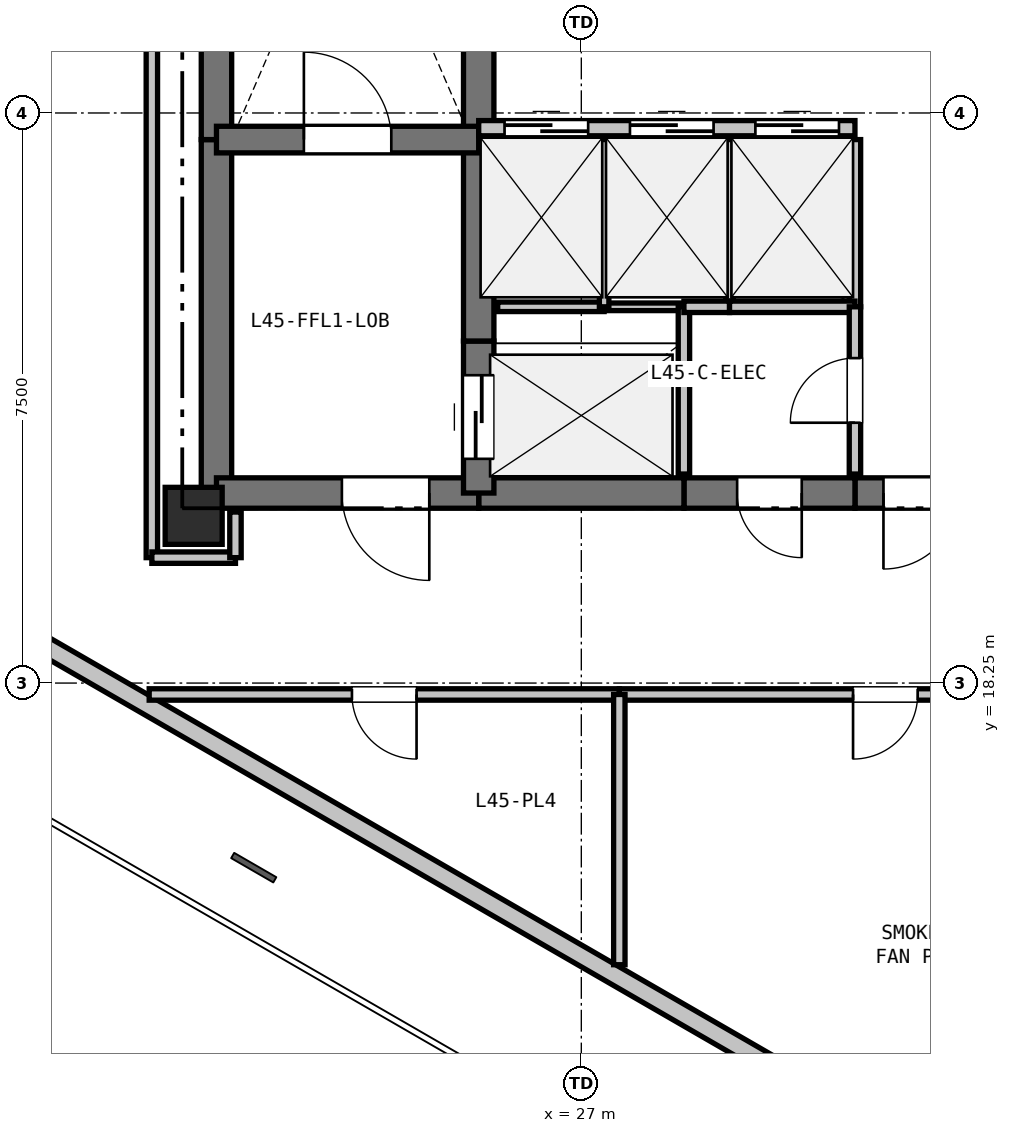
"""IFC4 building model, lengths in metres.
Left out: names, types, materials, properties, quantities, classifications, styles, units other than length and angle.
Written with IfcOpenShell. Run it as: python <this file> out.ifc"""

import sys

from ifc_helpers import new_model, si_unit, direction, frame, frame_2d, origin, origin_2d, place, context, subcontext, project, spatial, rectangle, extrude, element, fill, save


model = new_model("IFC4")
c1 = context("Model", 3, precision=1e-05, world=origin(), true_north=direction((0.0, 1.0)))
c2 = subcontext(c1, "Body", "Model", "MODEL_VIEW")
j1 = project(units=[si_unit("LENGTHUNIT", "METRE"), si_unit("PLANEANGLEUNIT", "RADIAN")], contexts=[c1])
p1 = place(None, origin())
s1 = spatial("IfcSite", under=j1, at=p1, CompositionType="ELEMENT")
p2 = place(p1, origin())
s2 = spatial("IfcBuilding", under=s1, at=p2, CompositionType="ELEMENT")
p3 = place(p2, frame((0.0, 0.0, 160.8)))
s3 = spatial("IfcBuildingStorey", under=s2, at=p3, CompositionType="ELEMENT", Elevation=160.8)
p4 = place(p3, frame((21.9, 20.45, 0.0), z_axis=(0.0, 0.0, 1.0), x_axis=(1.0, 0.0, 0.0)))
e1 = element("IfcColumn", 1, at=p4, inside=s3, PredefinedType="COLUMN", context=c2, shape_type="SweptSolid", body=[
    extrude(rectangle(XDim=0.75, YDim=0.75, at=origin_2d()), origin(), (0.0, 0.0, 1.0), 6.6),
])
p5 = place(p3, frame((38.22, 8.183, 0.0), z_axis=(0.0, 0.0, 1.0), x_axis=(-0.866026432802, 0.499998217685, 0.0)))
e2 = element("IfcWall", 2, at=p5, inside=s3, PredefinedType="SOLIDWALL", context=c2, shape_type="SweptSolid", body=[
    extrude(rectangle(XDim=34.537, YDim=0.25, at=frame_2d((17.269, 0.0))), origin(), (0.0, 0.0, 1.0), 5.005),
])
p6 = place(p3, frame((22.2, 20.75, 0.0), z_axis=(0.0, 0.0, 1.0), x_axis=(0.0, 1.0, 0.0)))
e3 = element("IfcWall", 3, at=p6, inside=s3, PredefinedType="SHEAR", context=c2, shape_type="SweptSolid", body=[
    extrude(rectangle(XDim=4.65, YDim=0.4, at=frame_2d((2.325, 0.0))), origin(), (0.0, 0.0, 1.0), 6.37),
])
p7 = place(p3, frame((22.2, 25.4, 0.0), z_axis=(0.0, 0.0, 1.0), x_axis=(0.0, 1.0, 0.0)))
e4 = element("IfcWall", 4, at=p7, inside=s3, PredefinedType="SHEAR", context=c2, shape_type="SweptSolid", body=[
    extrude(rectangle(XDim=7.35, YDim=0.4, at=frame_2d((3.675, 0.0))), origin(), (0.0, 0.0, 1.0), 6.37),
])
p8 = place(p3, frame((32.35, 20.75, 0.0), z_axis=(0.0, 0.0, 1.0), x_axis=(-1.0, 0.0, 0.0)))
e5 = element("IfcWall", 5, at=p8, inside=s3, PredefinedType="SHEAR", context=c2, shape_type="SweptSolid", body=[
    extrude(rectangle(XDim=1.75, YDim=0.4, at=frame_2d((0.875, 0.0))), origin(), (0.0, 0.0, 1.0), 6.37),
])
p9 = place(p8, frame((0.375, 0.0, 0.0)))
e6 = element("IfcOpeningElement", 6, at=p9, cuts=e5, PredefinedType="OPENING", context=c2, shape_type="SweptSolid", body=[
    extrude(rectangle(XDim=1.0, YDim=2.15, at=frame_2d((0.5, 1.075))), frame((0.0, 0.21, 0.0), z_axis=(0.0, -1.0, 0.0), x_axis=(1.0, 0.0, 0.0)), (0.0, 0.0, 1.0), 0.42),
])
p10 = place(p3, frame((30.6, 20.75, 0.0), z_axis=(0.0, 0.0, 1.0), x_axis=(-1.0, 0.0, 0.0)))
e7 = element("IfcWall", 7, at=p10, inside=s3, PredefinedType="SHEAR", context=c2, shape_type="SweptSolid", body=[
    extrude(rectangle(XDim=2.25, YDim=0.4, at=frame_2d((1.125, 0.0))), origin(), (0.0, 0.0, 1.0), 6.37),
])
p11 = place(p10, frame((0.7, 0.0, 0.0)))
e8 = element("IfcOpeningElement", 8, at=p11, cuts=e7, PredefinedType="OPENING", context=c2, shape_type="SweptSolid", body=[
    extrude(rectangle(XDim=0.85, YDim=2.1, at=frame_2d((0.425, 1.05))), frame((0.0, 0.21, 0.0), z_axis=(0.0, -1.0, 0.0), x_axis=(1.0, 0.0, 0.0)), (0.0, 0.0, 1.0), 0.42),
])
p12 = place(p3, frame((28.35, 20.75, 0.0), z_axis=(0.0, 0.0, 1.0), x_axis=(-1.0, 0.0, 0.0)))
e9 = element("IfcWall", 9, at=p12, inside=s3, PredefinedType="SHEAR", context=c2, shape_type="SweptSolid", body=[
    extrude(rectangle(XDim=2.7, YDim=0.4, at=frame_2d((1.35, 0.0))), origin(), (0.0, 0.0, 1.0), 6.37),
])
p13 = place(p3, frame((25.65, 20.75, 0.0), z_axis=(0.0, 0.0, 1.0), x_axis=(-1.0, 0.0, 0.0)))
e10 = element("IfcWall", 10, at=p13, inside=s3, PredefinedType="SHEAR", context=c2, shape_type="SweptSolid", body=[
    extrude(rectangle(XDim=3.45, YDim=0.4, at=frame_2d((1.725, 0.0))), origin(), (0.0, 0.0, 1.0), 6.37),
])
p14 = place(p13, frame((0.65, 0.0, 0.0)))
e11 = element("IfcOpeningElement", 11, at=p14, cuts=e10, PredefinedType="OPENING", context=c2, shape_type="SweptSolid", body=[
    extrude(rectangle(XDim=1.15, YDim=2.15, at=frame_2d((0.575, 1.075))), frame((0.0, 0.21, 0.0), z_axis=(0.0, -1.0, 0.0), x_axis=(1.0, 0.0, 0.0)), (0.0, 0.0, 1.0), 0.42),
])
p15 = place(p3, frame((25.65, 20.75, 0.0), z_axis=(0.0, 0.0, 1.0), x_axis=(0.0, 1.0, 0.0)))
e12 = element("IfcWall", 12, at=p15, inside=s3, PredefinedType="SHEAR", context=c2, shape_type="SweptSolid", body=[
    extrude(rectangle(XDim=2.0, YDim=0.4, at=frame_2d((1.0, 0.0))), origin(), (0.0, 0.0, 1.0), 6.37),
])
p16 = place(p15, frame((0.45, 0.0, 0.0)))
e13 = element("IfcOpeningElement", 13, at=p16, cuts=e12, PredefinedType="OPENING", context=c2, shape_type="SweptSolid", body=[
    extrude(rectangle(XDim=1.1, YDim=2.15, at=frame_2d((0.55, 1.075))), frame((0.0, 0.21, 0.0), z_axis=(0.0, -1.0, 0.0), x_axis=(1.0, 0.0, 0.0)), (0.0, 0.0, 1.0), 0.42),
])
p17 = place(p3, frame((25.65, 22.75, 0.0), z_axis=(0.0, 0.0, 1.0), x_axis=(0.0, 1.0, 0.0)))
e14 = element("IfcWall", 14, at=p17, inside=s3, PredefinedType="SHEAR", context=c2, shape_type="SweptSolid", body=[
    extrude(rectangle(XDim=2.8, YDim=0.4, at=frame_2d((1.4, 0.0))), origin(), (0.0, 0.0, 1.0), 6.37),
])
p18 = place(p3, frame((25.65, 25.55, 0.0), z_axis=(0.0, 0.0, 1.0), x_axis=(0.0, 1.0, 0.0)))
e15 = element("IfcWall", 15, at=p18, inside=s3, PredefinedType="SHEAR", context=c2, shape_type="SweptSolid", body=[
    extrude(rectangle(XDim=2.4, YDim=0.4, at=frame_2d((1.2, 0.0))), origin(), (0.0, 0.0, 1.0), 6.37),
])
p19 = place(p3, frame((22.2, 25.4, 0.0), z_axis=(0.0, 0.0, 1.0), x_axis=(1.0, 0.0, 0.0)))
e16 = element("IfcWall", 16, at=p19, inside=s3, PredefinedType="SHEAR", context=c2, shape_type="SweptSolid", body=[
    extrude(rectangle(XDim=3.45, YDim=0.35, at=frame_2d((1.725, 0.0))), origin(), (0.0, 0.0, 1.0), 6.37),
])
p20 = place(p19, frame((1.15, 0.0, 0.0)))
e17 = element("IfcOpeningElement", 17, at=p20, cuts=e16, PredefinedType="OPENING", context=c2, shape_type="SweptSolid", body=[
    extrude(rectangle(XDim=1.15, YDim=2.15, at=frame_2d((0.575, 1.075))), frame((0.0, 0.185, 0.0), z_axis=(0.0, -1.0, 0.0), x_axis=(1.0, 0.0, 0.0)), (0.0, 0.0, 1.0), 0.37),
])
p21 = place(p3, frame((25.65, 25.55, 0.0), z_axis=(0.0, 0.0, 1.0), x_axis=(1.0, 0.0, 0.0)))
e18 = element("IfcWall", 18, at=p21, inside=s3, PredefinedType="PARTITIONING", context=c2, shape_type="SweptSolid", body=[
    extrude(rectangle(XDim=4.95, YDim=0.2, at=frame_2d((2.475, 0.0))), origin(), (0.0, 0.0, 1.0), 6.37),
])
p22 = place(p21, frame((0.34, 0.0, 0.0)))
e19 = element("IfcOpeningElement", 19, at=p22, cuts=e18, PredefinedType="OPENING", context=c2, shape_type="SweptSolid", body=[
    extrude(rectangle(XDim=1.1, YDim=2.15, at=frame_2d((0.55, 1.075))), frame((0.0, 0.11, 0.0), z_axis=(0.0, -1.0, 0.0), x_axis=(1.0, 0.0, 0.0)), (0.0, 0.0, 1.0), 0.22),
])
p23 = place(p21, frame((1.99, 0.0, 0.0)))
e20 = element("IfcOpeningElement", 20, at=p23, cuts=e18, PredefinedType="OPENING", context=c2, shape_type="SweptSolid", body=[
    extrude(rectangle(XDim=1.1, YDim=2.15, at=frame_2d((0.55, 1.075))), frame((0.0, 0.11, 0.0), z_axis=(0.0, -1.0, 0.0), x_axis=(1.0, 0.0, 0.0)), (0.0, 0.0, 1.0), 0.22),
])
p24 = place(p21, frame((3.64, 0.0, 0.0)))
e21 = element("IfcOpeningElement", 21, at=p24, cuts=e18, PredefinedType="OPENING", context=c2, shape_type="SweptSolid", body=[
    extrude(rectangle(XDim=1.1, YDim=2.15, at=frame_2d((0.55, 1.075))), frame((0.0, 0.11, 0.0), z_axis=(0.0, -1.0, 0.0), x_axis=(1.0, 0.0, 0.0)), (0.0, 0.0, 1.0), 0.22),
])
p25 = place(p3, frame((25.9, 23.2, 0.0), z_axis=(0.0, 0.0, 1.0), x_axis=(1.0, 0.0, 0.0)))
e22 = element("IfcWall", 22, at=p25, inside=s3, PredefinedType="PARTITIONING", context=c2, shape_type="SweptSolid", body=[
    extrude(rectangle(XDim=1.4, YDim=0.125, at=frame_2d((0.7, 0.0))), origin(), (0.0, 0.0, 1.0), 6.37),
])
p26 = place(p3, frame((27.3, 23.2, 0.0), z_axis=(0.0, 0.0, 1.0), x_axis=(1.0, 0.0, 0.0)))
e23 = element("IfcWall", 23, at=p26, inside=s3, PredefinedType="PARTITIONING", context=c2, shape_type="SweptSolid", body=[
    extrude(rectangle(XDim=1.05, YDim=0.1, at=frame_2d((0.525, 0.0))), origin(), (0.0, 0.0, 1.0), 6.37),
])
p27 = place(p3, frame((28.35, 23.2, 0.0), z_axis=(0.0, 0.0, 1.0), x_axis=(0.0, -1.0, 0.0)))
e24 = element("IfcWall", 24, at=p27, inside=s3, PredefinedType="PARTITIONING", context=c2, shape_type="SweptSolid", body=[
    extrude(rectangle(XDim=2.2, YDim=0.15, at=frame_2d((1.1, 0.0))), origin(), (0.0, 0.0, 1.0), 6.37),
])
p28 = place(p3, frame((27.3, 25.4, 0.0), z_axis=(0.0, 0.0, 1.0), x_axis=(0.0, -1.0, 0.0)))
e25 = element("IfcWall", 25, at=p28, inside=s3, PredefinedType="PARTITIONING", context=c2, shape_type="SweptSolid", body=[
    extrude(rectangle(XDim=2.2, YDim=0.125, at=frame_2d((1.1, 0.0))), origin(), (0.0, 0.0, 1.0), 6.37),
])
p29 = place(p3, frame((28.95, 25.4, 0.0), z_axis=(0.0, 0.0, 1.0), x_axis=(0.0, -1.0, 0.0)))
e26 = element("IfcWall", 26, at=p29, inside=s3, PredefinedType="PARTITIONING", context=c2, shape_type="SweptSolid", body=[
    extrude(rectangle(XDim=2.2, YDim=0.1, at=frame_2d((1.1, 0.0))), origin(), (0.0, 0.0, 1.0), 6.37),
])
p30 = place(p3, frame((28.95, 23.2, 0.0), z_axis=(0.0, 0.0, 1.0), x_axis=(-1.0, 0.0, 0.0)))
e27 = element("IfcWall", 27, at=p30, inside=s3, PredefinedType="PARTITIONING", context=c2, shape_type="SweptSolid", body=[
    extrude(rectangle(XDim=0.6, YDim=0.15, at=frame_2d((0.3, 0.0))), origin(), (0.0, 0.0, 1.0), 6.37),
])
p31 = place(p3, frame((30.6, 25.4, 0.0), z_axis=(0.0, 0.0, 1.0), x_axis=(0.0, -1.0, 0.0)))
e28 = element("IfcWall", 28, at=p31, inside=s3, PredefinedType="PARTITIONING", context=c2, shape_type="SweptSolid", body=[
    extrude(rectangle(XDim=2.2, YDim=0.15, at=frame_2d((1.1, 0.0))), origin(), (0.0, 0.0, 1.0), 6.37),
])
p32 = place(p3, frame((30.6, 23.2, 0.0), z_axis=(0.0, 0.0, 1.0), x_axis=(-1.0, 0.0, 0.0)))
e29 = element("IfcWall", 29, at=p32, inside=s3, PredefinedType="PARTITIONING", context=c2, shape_type="SweptSolid", body=[
    extrude(rectangle(XDim=1.65, YDim=0.15, at=frame_2d((0.825, 0.0))), origin(), (0.0, 0.0, 1.0), 6.37),
])
p33 = place(p3, frame((30.6, 21.0, 0.0), z_axis=(0.0, 0.0, 1.0), x_axis=(0.0, 1.0, 0.0)))
e30 = element("IfcWall", 30, at=p33, inside=s3, PredefinedType="PARTITIONING", context=c2, shape_type="SweptSolid", body=[
    extrude(rectangle(XDim=2.2, YDim=0.15, at=frame_2d((1.1, 0.0))), origin(), (0.0, 0.0, 1.0), 6.37),
])
p34 = place(p33, frame((0.675, 0.0, 0.0)))
e31 = element("IfcOpeningElement", 31, at=p34, cuts=e30, PredefinedType="OPENING", context=c2, shape_type="SweptSolid", body=[
    extrude(rectangle(XDim=0.85, YDim=2.1, at=frame_2d((0.425, 1.05))), frame((0.0, 0.085, 0.0), z_axis=(0.0, -1.0, 0.0), x_axis=(1.0, 0.0, 0.0)), (0.0, 0.0, 1.0), 0.17),
])
p35 = place(p3, frame((21.35, 33.6, 0.0), z_axis=(0.0, 0.0, 1.0), x_axis=(0.0, -1.0, 0.0)))
e32 = element("IfcWall", 32, at=p35, inside=s3, PredefinedType="PARTITIONING", context=c2, shape_type="SweptSolid", body=[
    extrude(rectangle(XDim=13.7, YDim=0.15, at=frame_2d((6.85, 0.0))), origin(), (0.0, 0.0, 1.0), 4.755),
])
p36 = place(p3, frame((21.35, 19.9, 0.0), z_axis=(0.0, 0.0, 1.0), x_axis=(1.0, 0.0, 0.0)))
e33 = element("IfcWall", 33, at=p36, inside=s3, PredefinedType="PARTITIONING", context=c2, shape_type="SweptSolid", body=[
    extrude(rectangle(XDim=1.1, YDim=0.15, at=frame_2d((0.55, 0.0))), origin(), (0.0, 0.0, 1.0), 6.37),
])
p37 = place(p3, frame((22.45, 19.9, 0.0), z_axis=(0.0, 0.0, 1.0), x_axis=(0.0, 1.0, 0.0)))
e34 = element("IfcWall", 34, at=p37, inside=s3, PredefinedType="PARTITIONING", context=c2, shape_type="SweptSolid", body=[
    extrude(rectangle(XDim=0.6, YDim=0.15, at=frame_2d((0.3, 0.0))), origin(), (0.0, 0.0, 1.0), 5.895),
])
p38 = place(p3, frame((34.5, 18.1, 0.0), z_axis=(0.0, 0.0, 1.0), x_axis=(-1.0, 0.0, 0.0)))
e35 = element("IfcWall", 35, at=p38, inside=s3, PredefinedType="PARTITIONING", context=c2, shape_type="SweptSolid", body=[
    extrude(rectangle(XDim=7.0, YDim=0.15, at=frame_2d((3.5, 0.0))), origin(), (0.0, 0.0, 1.0), 5.005),
])
p39 = place(p38, frame((3.075, 0.0, 0.0)))
e36 = element("IfcOpeningElement", 36, at=p39, cuts=e35, PredefinedType="OPENING", context=c2, shape_type="SweptSolid", body=[
    extrude(rectangle(XDim=0.85, YDim=2.1, at=frame_2d((0.425, 1.05))), frame((0.0, 0.085, 0.0), z_axis=(0.0, -1.0, 0.0), x_axis=(1.0, 0.0, 0.0)), (0.0, 0.0, 1.0), 0.17),
])
p40 = place(p3, frame((27.5, 18.1, 0.0), z_axis=(0.0, 0.0, 1.0), x_axis=(-1.0, 0.0, 0.0)))
e37 = element("IfcWall", 37, at=p40, inside=s3, PredefinedType="PARTITIONING", context=c2, shape_type="SweptSolid", body=[
    extrude(rectangle(XDim=6.185, YDim=0.15, at=frame_2d((3.093, 0.0))), origin(), (0.0, 0.0, 1.0), 6.37),
])
p41 = place(p40, frame((2.667, 0.0, 0.0)))
e38 = element("IfcOpeningElement", 38, at=p41, cuts=e37, PredefinedType="OPENING", context=c2, shape_type="SweptSolid", body=[
    extrude(rectangle(XDim=0.85, YDim=2.1, at=frame_2d((0.425, 1.05))), frame((0.0, 0.085, 0.0), z_axis=(0.0, -1.0, 0.0), x_axis=(1.0, 0.0, 0.0)), (0.0, 0.0, 1.0), 0.17),
])
p42 = place(p3, frame((27.5, 18.1, 0.0), z_axis=(0.0, 0.0, 1.0), x_axis=(0.0, -1.0, 0.0)))
e39 = element("IfcWall", 39, at=p42, inside=s3, PredefinedType="PARTITIONING", context=c2, shape_type="SweptSolid", body=[
    extrude(rectangle(XDim=3.555, YDim=0.15, at=frame_2d((1.778, 0.0))), origin(), (0.0, 0.0, 1.0), 6.37),
])
p43 = place(p22, origin())
e40 = element("IfcDoor", 40, at=p43, inside=s3, OperationType="SLIDING_TO_LEFT", PredefinedType="DOOR", context=c2, shape_type="SweptSolid", body=[
    extrude(rectangle(XDim=1.1, YDim=2.15, at=frame_2d((0.55, 1.075))), frame((0.0, 0.025, 0.0), z_axis=(0.0, -1.0, 0.0), x_axis=(1.0, 0.0, 0.0)), (0.0, 0.0, 1.0), 0.05),
])
fill(e19, e40)
p44 = place(p23, origin())
e41 = element("IfcDoor", 41, at=p44, inside=s3, OperationType="SLIDING_TO_LEFT", PredefinedType="DOOR", context=c2, shape_type="SweptSolid", body=[
    extrude(rectangle(XDim=1.1, YDim=2.15, at=frame_2d((0.55, 1.075))), frame((0.0, 0.025, 0.0), z_axis=(0.0, -1.0, 0.0), x_axis=(1.0, 0.0, 0.0)), (0.0, 0.0, 1.0), 0.05),
])
fill(e20, e41)
p45 = place(p24, origin())
e42 = element("IfcDoor", 42, at=p45, inside=s3, OperationType="SLIDING_TO_LEFT", PredefinedType="DOOR", context=c2, shape_type="SweptSolid", body=[
    extrude(rectangle(XDim=1.1, YDim=2.15, at=frame_2d((0.55, 1.075))), frame((0.0, 0.025, 0.0), z_axis=(0.0, -1.0, 0.0), x_axis=(1.0, 0.0, 0.0)), (0.0, 0.0, 1.0), 0.05),
])
fill(e21, e42)
p46 = place(p9, origin())
e43 = element("IfcDoor", 43, at=p46, inside=s3, OperationType="SINGLE_SWING_RIGHT", PredefinedType="DOOR", context=c2, shape_type="SweptSolid", body=[
    extrude(rectangle(XDim=1.0, YDim=2.15, at=frame_2d((0.5, 1.075))), frame((0.0, 0.025, 0.0), z_axis=(0.0, -1.0, 0.0), x_axis=(1.0, 0.0, 0.0)), (0.0, 0.0, 1.0), 0.05),
])
fill(e6, e43)
p47 = place(p16, origin())
e44 = element("IfcDoor", 44, at=p47, inside=s3, OperationType="SLIDING_TO_LEFT", PredefinedType="DOOR", context=c2, shape_type="SweptSolid", body=[
    extrude(rectangle(XDim=1.1, YDim=2.15, at=frame_2d((0.55, 1.075))), frame((0.0, 0.025, 0.0), z_axis=(0.0, -1.0, 0.0), x_axis=(1.0, 0.0, 0.0)), (0.0, 0.0, 1.0), 0.05),
])
fill(e13, e44)
p48 = place(p20, origin())
e45 = element("IfcDoor", 45, at=p48, inside=s3, OperationType="SINGLE_SWING_LEFT", PredefinedType="DOOR", context=c2, shape_type="SweptSolid", body=[
    extrude(rectangle(XDim=1.15, YDim=2.15, at=frame_2d((0.575, 1.075))), frame((0.0, 0.025, 0.0), z_axis=(0.0, -1.0, 0.0), x_axis=(1.0, 0.0, 0.0)), (0.0, 0.0, 1.0), 0.05),
])
fill(e17, e45)
p49 = place(p14, origin())
e46 = element("IfcDoor", 46, at=p49, inside=s3, OperationType="SINGLE_SWING_LEFT", PredefinedType="DOOR", context=c2, shape_type="SweptSolid", body=[
    extrude(rectangle(XDim=1.15, YDim=2.15, at=frame_2d((0.575, 1.075))), frame((0.0, 0.025, 0.0), z_axis=(0.0, -1.0, 0.0), x_axis=(1.0, 0.0, 0.0)), (0.0, 0.0, 1.0), 0.05),
])
fill(e11, e46)
p50 = place(p34, origin())
e47 = element("IfcDoor", 47, at=p50, inside=s3, OperationType="SINGLE_SWING_LEFT", PredefinedType="DOOR", context=c2, shape_type="SweptSolid", body=[
    extrude(rectangle(XDim=0.85, YDim=2.1, at=frame_2d((0.425, 1.05))), frame((0.0, 0.025, 0.0), z_axis=(0.0, -1.0, 0.0), x_axis=(1.0, 0.0, 0.0)), (0.0, 0.0, 1.0), 0.05),
])
fill(e31, e47)
p51 = place(p11, origin())
e48 = element("IfcDoor", 48, at=p51, inside=s3, OperationType="SINGLE_SWING_LEFT", PredefinedType="DOOR", context=c2, shape_type="SweptSolid", body=[
    extrude(rectangle(XDim=0.85, YDim=2.1, at=frame_2d((0.425, 1.05))), frame((0.0, 0.025, 0.0), z_axis=(0.0, -1.0, 0.0), x_axis=(1.0, 0.0, 0.0)), (0.0, 0.0, 1.0), 0.05),
])
fill(e8, e48)
p52 = place(p41, origin())
e49 = element("IfcDoor", 49, at=p52, inside=s3, OperationType="SINGLE_SWING_LEFT", PredefinedType="DOOR", context=c2, shape_type="SweptSolid", body=[
    extrude(rectangle(XDim=0.85, YDim=2.1, at=frame_2d((0.425, 1.05))), frame((0.0, 0.025, 0.0), z_axis=(0.0, -1.0, 0.0), x_axis=(1.0, 0.0, 0.0)), (0.0, 0.0, 1.0), 0.05),
])
fill(e38, e49)
p53 = place(p39, origin())
e50 = element("IfcDoor", 50, at=p53, inside=s3, OperationType="SINGLE_SWING_RIGHT", PredefinedType="DOOR", context=c2, shape_type="SweptSolid", body=[
    extrude(rectangle(XDim=0.85, YDim=2.1, at=frame_2d((0.425, 1.05))), frame((0.0, 0.025, 0.0), z_axis=(0.0, -1.0, 0.0), x_axis=(1.0, 0.0, 0.0)), (0.0, 0.0, 1.0), 0.05),
])
fill(e36, e50)
save(model, sys.argv[1])
